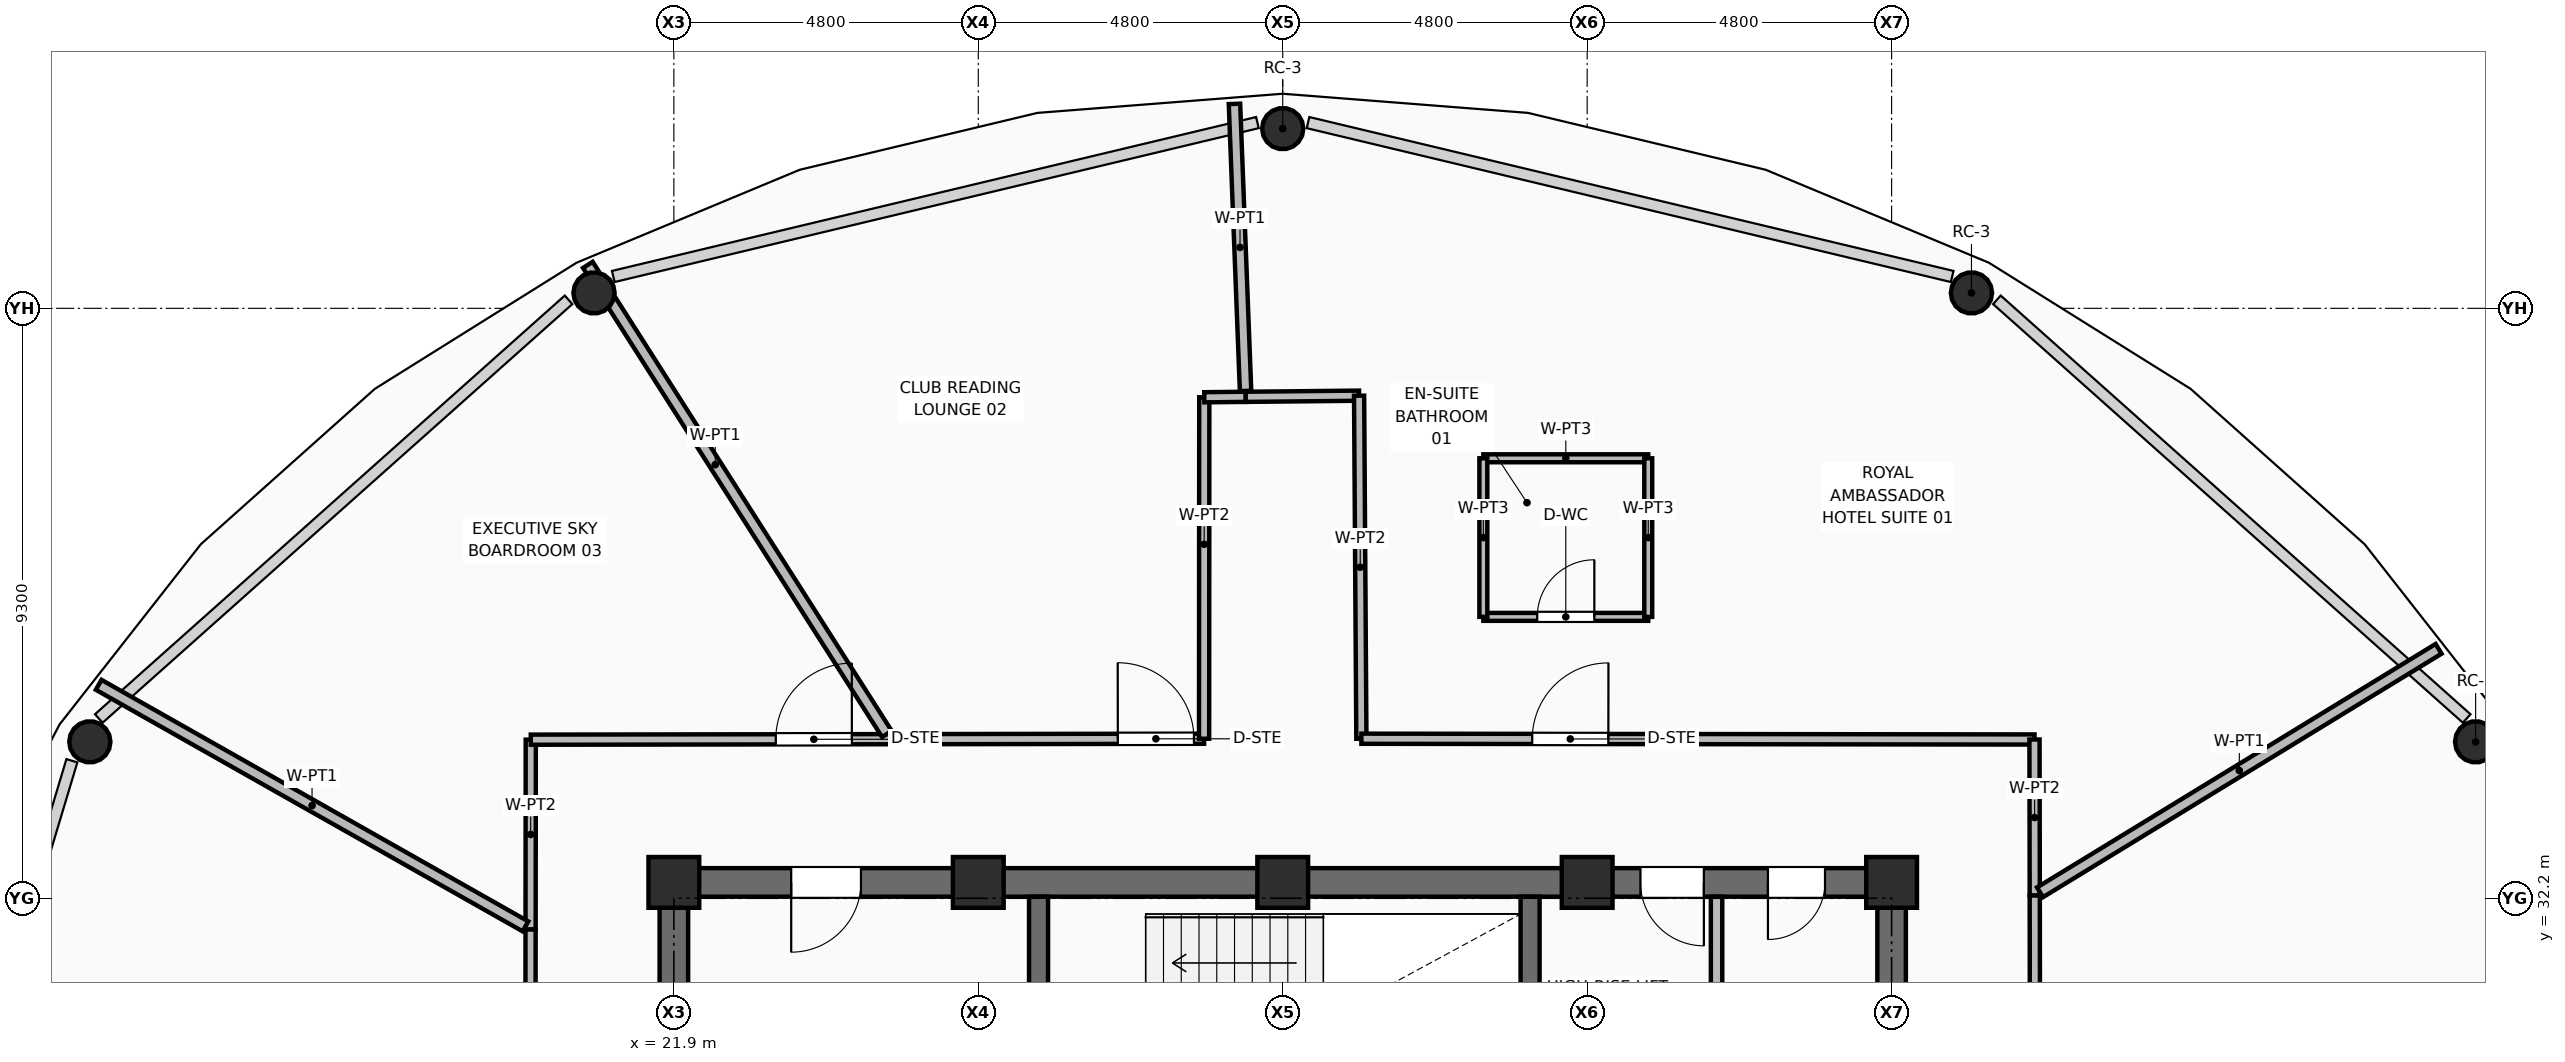
"""IFC4 building model, lengths in metres.
Left out: names, types, materials, properties, quantities, classifications, styles, units other than length and angle.
Written with IfcOpenShell. Run it as: python <this file> out.ifc"""

import sys

from ifc_helpers import new_model, si_unit, direction, frame, frame_2d, origin, origin_2d, place, context, subcontext, project, spatial, rectangle, hollow_circle, extrude, element, fill, save


model = new_model("IFC4")
c1 = context("Model", 3, precision=1e-05, world=origin(), true_north=direction((0.0, 1.0)))
c2 = subcontext(c1, "Body", "Model", "MODEL_VIEW")
j1 = project(units=[si_unit("LENGTHUNIT", "METRE"), si_unit("PLANEANGLEUNIT", "RADIAN")], contexts=[c1])
p1 = place(None, origin())
s1 = spatial("IfcSite", under=j1, at=p1, CompositionType="ELEMENT")
p2 = place(p1, origin())
s2 = spatial("IfcBuilding", under=s1, at=p2, CompositionType="ELEMENT")
p3 = place(p2, frame((0.0, 0.0, 246.15)))
s3 = spatial("IfcBuildingStorey", under=s2, at=p3, CompositionType="ELEMENT", Elevation=246.15)
for number, where, z_axis, x_axis in (
    (1, (21.9, 32.45, 0.0), (0.0, 0.0, 1.0), (1.0, 0.0, 0.0)),
    (2, (26.7, 32.45, 0.0), (0.0, 0.0, 1.0), (1.0, 0.0, 0.0)),
    (3, (31.5, 32.45, 0.0), (0.0, 0.0, 1.0), (1.0, 0.0, 0.0)),
    (4, (36.3, 32.45, 0.0), (0.0, 0.0, 1.0), (1.0, 0.0, 0.0)),
    (5, (41.1, 32.45, 0.0), (0.0, 0.0, 1.0), (1.0, 0.0, 0.0)),
):
    element("IfcColumn", number, at=place(p3, frame(where, z_axis=z_axis, x_axis=x_axis)), inside=s3, PredefinedType="COLUMN", context=c2, shape_type="SweptSolid", body=[
        extrude(rectangle(XDim=0.8, YDim=0.8, at=origin_2d()), origin(), (0.0, 0.0, 1.0), 3.75),
    ])
for number, where, z_axis, x_axis in (
    (6, (50.308, 34.666, 0.0), (0.0, 0.0, 1.0), (1.0, 0.0, 0.0)),
    (7, (42.359, 41.743, 0.0), (0.0, 0.0, 1.0), (1.0, 0.0, 0.0)),
    (8, (31.5, 44.333, 0.0), (0.0, 0.0, 1.0), (1.0, 0.0, 0.0)),
    (9, (20.641, 41.743, 0.0), (0.0, 0.0, 1.0), (1.0, 0.0, 0.0)),
    (10, (12.692, 34.666, 0.0), (0.0, 0.0, 1.0), (1.0, 0.0, 0.0)),
):
    element("IfcColumn", number, at=place(p3, frame(where, z_axis=z_axis, x_axis=x_axis)), inside=s3, PredefinedType="COLUMN", context=c2, shape_type="SweptSolid", body=[
        extrude(hollow_circle(Radius=0.325, WallThickness=0.03, at=origin_2d()), origin(), (0.0, 0.0, 1.0), 3.57),
    ])
p4 = place(p3, frame((21.675, 32.45, 0.0), z_axis=(0.0, 0.0, 1.0), x_axis=(1.0, 0.0, 0.0)))
e11 = element("IfcWall", 11, at=p4, inside=s3, PredefinedType="SHEAR", context=c2, shape_type="SweptSolid", body=[
    extrude(rectangle(XDim=19.65, YDim=0.45, at=frame_2d((9.825, 0.0))), origin(), (0.0, 0.0, 1.0), 3.57),
])
p5 = place(p4, frame((2.075, 0.0, 0.0)))
e12 = element("IfcOpeningElement", 12, at=p5, cuts=e11, PredefinedType="OPENING", context=c2, shape_type="SweptSolid", body=[
    extrude(rectangle(XDim=1.1, YDim=2.1, at=frame_2d((0.55, 1.05))), frame((0.0, 0.235, 0.0), z_axis=(0.0, -1.0, 0.0), x_axis=(1.0, 0.0, 0.0)), (0.0, 0.0, 1.0), 0.47),
])
p6 = place(p4, frame((15.465, 0.0, 0.0)))
e13 = element("IfcOpeningElement", 13, at=p6, cuts=e11, PredefinedType="OPENING", context=c2, shape_type="SweptSolid", body=[
    extrude(rectangle(XDim=1.0, YDim=2.1, at=frame_2d((0.5, 1.05))), frame((0.0, 0.235, 0.0), z_axis=(0.0, -1.0, 0.0), x_axis=(1.0, 0.0, 0.0)), (0.0, 0.0, 1.0), 0.47),
])
p7 = place(p4, frame((17.475, 0.0, 0.0)))
e14 = element("IfcOpeningElement", 14, at=p7, cuts=e11, PredefinedType="OPENING", context=c2, shape_type="SweptSolid", body=[
    extrude(rectangle(XDim=0.9, YDim=2.1, at=frame_2d((0.45, 1.05))), frame((0.0, 0.235, 0.0), z_axis=(0.0, -1.0, 0.0), x_axis=(1.0, 0.0, 0.0)), (0.0, 0.0, 1.0), 0.47),
])
p8 = place(p3, frame((21.9, 18.025, 0.0), z_axis=(0.0, 0.0, 1.0), x_axis=(0.0, 1.0, 0.0)))
e15 = element("IfcWall", 15, at=p8, inside=s3, PredefinedType="SHEAR", context=c2, shape_type="SweptSolid", body=[
    extrude(rectangle(XDim=14.2, YDim=0.45, at=frame_2d((7.1, 0.0))), origin(), (0.0, 0.0, 1.0), 3.57),
])
p9 = place(p3, frame((41.1, 18.025, 0.0), z_axis=(0.0, 0.0, 1.0), x_axis=(0.0, 1.0, 0.0)))
e16 = element("IfcWall", 16, at=p9, inside=s3, PredefinedType="SHEAR", context=c2, shape_type="SweptSolid", body=[
    extrude(rectangle(XDim=14.2, YDim=0.45, at=frame_2d((7.1, 0.0))), origin(), (0.0, 0.0, 1.0), 3.57),
])
p10 = place(p9, frame((3.435, 0.0, 0.0)))
e17 = element("IfcOpeningElement", 17, at=p10, cuts=e16, PredefinedType="OPENING", context=c2, shape_type="SweptSolid", body=[
    extrude(rectangle(XDim=1.05, YDim=2.1, at=frame_2d((0.525, 1.05))), frame((0.0, 0.235, 0.0), z_axis=(0.0, -1.0, 0.0), x_axis=(1.0, 0.0, 0.0)), (0.0, 0.0, 1.0), 0.47),
])
p11 = place(p3, frame((27.65, 28.75, 0.0), z_axis=(0.0, 0.0, 1.0), x_axis=(0.0, 1.0, 0.0)))
e18 = element("IfcWall", 18, at=p11, inside=s3, PredefinedType="SHEAR", context=c2, shape_type="SweptSolid", body=[
    extrude(rectangle(XDim=3.475, YDim=0.3, at=frame_2d((1.738, 0.0))), origin(), (0.0, 0.0, 1.0), 3.57),
])
p12 = place(p11, frame((1.0, 0.0, 0.0)))
e19 = element("IfcOpeningElement", 19, at=p12, cuts=e18, PredefinedType="OPENING", context=c2, shape_type="SweptSolid", body=[
    extrude(rectangle(XDim=1.05, YDim=2.1, at=frame_2d((0.525, 1.05))), frame((0.0, 0.16, 0.0), z_axis=(0.0, -1.0, 0.0), x_axis=(1.0, 0.0, 0.0)), (0.0, 0.0, 1.0), 0.32),
])
p13 = place(p3, frame((35.4, 28.75, 0.0), z_axis=(0.0, 0.0, 1.0), x_axis=(0.0, 1.0, 0.0)))
e20 = element("IfcWall", 20, at=p13, inside=s3, PredefinedType="SHEAR", context=c2, shape_type="SweptSolid", body=[
    extrude(rectangle(XDim=3.475, YDim=0.3, at=frame_2d((1.738, 0.0))), origin(), (0.0, 0.0, 1.0), 3.57),
])
p14 = place(p3, frame((38.34, 28.62, 0.0), z_axis=(0.0, 0.0, 1.0), x_axis=(0.0, 1.0, 0.0)))
e21 = element("IfcWall", 21, at=p14, inside=s3, PredefinedType="PARTITIONING", context=c2, shape_type="SweptSolid", body=[
    extrude(rectangle(XDim=3.605, YDim=0.18, at=frame_2d((1.802, 0.0))), origin(), (0.0, 0.0, 1.0), 3.55),
])
p15 = place(p3, frame((19.636, 26.142, 0.0), z_axis=(0.0, 0.0, 1.0), x_axis=(0.000920648448, 0.999999576203, 0.0)))
e22 = element("IfcWall", 22, at=p15, inside=s3, PredefinedType="PARTITIONING", context=c2, shape_type="SweptSolid", body=[
    extrude(rectangle(XDim=5.569, YDim=0.16, at=frame_2d((2.784, 0.0))), origin(), (0.0, 0.0, 1.0), 3.55),
])
p16 = place(p15, frame((0.16, 0.0, 0.0)))
e23 = element("IfcOpeningElement", 23, at=p16, cuts=e22, PredefinedType="OPENING", context=c2, shape_type="SweptSolid", body=[
    extrude(rectangle(XDim=1.2, YDim=2.1, at=frame_2d((0.6, 1.05))), frame((0.0, 0.09, 0.0), z_axis=(0.0, -1.0, 0.0), x_axis=(1.0, 0.0, 0.0)), (0.0, 0.0, 1.0), 0.18),
])
p17 = place(p3, frame((19.641, 31.711, 0.0), z_axis=(0.0, 0.0, 1.0), x_axis=(0.000980151453, 0.999999519651, 0.0)))
e24 = element("IfcWall", 24, at=p17, inside=s3, PredefinedType="PARTITIONING", context=c2, shape_type="SweptSolid", body=[
    extrude(rectangle(XDim=2.989, YDim=0.16, at=frame_2d((1.495, 0.0))), origin(), (0.0, 0.0, 1.0), 3.081),
])
p18 = place(p3, frame((19.644, 34.7, 0.0), z_axis=(0.0, 0.0, 1.0), x_axis=(0.999998989417, 0.001421677005, 0.0)))
e25 = element("IfcWall", 25, at=p18, inside=s3, PredefinedType="PARTITIONING", context=c2, shape_type="SweptSolid", body=[
    extrude(rectangle(XDim=5.667, YDim=0.16, at=frame_2d((2.833, 0.0))), origin(), (0.0, 0.0, 1.0), 3.081),
])
p19 = place(p18, frame((3.863, 0.0, 0.0)))
e26 = element("IfcOpeningElement", 26, at=p19, cuts=e25, PredefinedType="OPENING", context=c2, shape_type="SweptSolid", body=[
    extrude(rectangle(XDim=1.2, YDim=2.1, at=frame_2d((0.6, 1.05))), frame((0.0, 0.09, 0.0), z_axis=(0.0, -1.0, 0.0), x_axis=(1.0, 0.0, 0.0)), (0.0, 0.0, 1.0), 0.18),
])
p20 = place(p3, frame((25.311, 34.708, 0.0), z_axis=(0.0, 0.0, 1.0), x_axis=(0.999998976672, 0.001430613701, 0.0)))
e27 = element("IfcWall", 27, at=p20, inside=s3, PredefinedType="PARTITIONING", context=c2, shape_type="SweptSolid", body=[
    extrude(rectangle(XDim=4.949, YDim=0.16, at=frame_2d((2.475, 0.0))), origin(), (0.0, 0.0, 1.0), 3.55),
])
p21 = place(p20, frame((3.589, 0.0, 0.0)))
e28 = element("IfcOpeningElement", 28, at=p21, cuts=e27, PredefinedType="OPENING", context=c2, shape_type="SweptSolid", body=[
    extrude(rectangle(XDim=1.2, YDim=2.1, at=frame_2d((0.6, 1.05))), frame((0.0, 0.09, 0.0), z_axis=(0.0, -1.0, 0.0), x_axis=(1.0, 0.0, 0.0)), (0.0, 0.0, 1.0), 0.18),
])
p22 = place(p3, frame((30.26, 34.715, 0.0), z_axis=(0.0, 0.0, 1.0), x_axis=(0.000544266973, 0.999999851887, 0.0)))
e29 = element("IfcWall", 29, at=p22, inside=s3, PredefinedType="PARTITIONING", context=c2, shape_type="SweptSolid", body=[
    extrude(rectangle(XDim=5.383, YDim=0.16, at=frame_2d((2.691, 0.0))), origin(), (0.0, 0.0, 1.0), 3.55),
])
p23 = place(p3, frame((30.263, 40.098, 0.0), z_axis=(0.0, 0.0, 1.0), x_axis=(0.999941415543, 0.010824300504, 0.0)))
e30 = element("IfcWall", 30, at=p23, inside=s3, PredefinedType="PARTITIONING", context=c2, shape_type="SweptSolid", body=[
    extrude(rectangle(XDim=0.654, YDim=0.16, at=frame_2d((0.327, 0.0))), origin(), (0.0, 0.0, 1.0), 3.55),
])
p24 = place(p3, frame((30.917, 40.105, 0.0), z_axis=(0.0, 0.0, 1.0), x_axis=(0.999948905048, 0.010108773084, 0.0)))
e31 = element("IfcWall", 31, at=p24, inside=s3, PredefinedType="PARTITIONING", context=c2, shape_type="SweptSolid", body=[
    extrude(rectangle(XDim=1.787, YDim=0.16, at=frame_2d((0.894, 0.0))), origin(), (0.0, 0.0, 1.0), 3.081),
])
p25 = place(p3, frame((32.704, 40.123, 0.0), z_axis=(0.0, 0.0, 1.0), x_axis=(0.006636123117, -0.999977980693, 0.0)))
e32 = element("IfcWall", 32, at=p25, inside=s3, PredefinedType="PARTITIONING", context=c2, shape_type="SweptSolid", body=[
    extrude(rectangle(XDim=5.408, YDim=0.16, at=frame_2d((2.704, 0.0))), origin(), (0.0, 0.0, 1.0), 3.55),
])
p26 = place(p3, frame((32.74, 34.715, 0.0), z_axis=(0.0, 0.0, 1.0), x_axis=(0.99999933853, -0.001150191321, 0.0)))
e33 = element("IfcWall", 33, at=p26, inside=s3, PredefinedType="PARTITIONING", context=c2, shape_type="SweptSolid", body=[
    extrude(rectangle(XDim=10.613, YDim=0.16, at=frame_2d((5.307, 0.0))), origin(), (0.0, 0.0, 1.0), 3.081),
])
p27 = place(p26, frame((2.694, 0.0, 0.0)))
e34 = element("IfcOpeningElement", 34, at=p27, cuts=e33, PredefinedType="OPENING", context=c2, shape_type="SweptSolid", body=[
    extrude(rectangle(XDim=1.2, YDim=2.1, at=frame_2d((0.6, 1.05))), frame((0.0, 0.09, 0.0), z_axis=(0.0, -1.0, 0.0), x_axis=(1.0, 0.0, 0.0)), (0.0, 0.0, 1.0), 0.18),
])
p28 = place(p3, frame((43.353, 34.703, 0.0), z_axis=(0.0, 0.0, 1.0), x_axis=(0.001587929717, -0.999998739239, 0.0)))
e35 = element("IfcWall", 35, at=p28, inside=s3, PredefinedType="PARTITIONING", context=c2, shape_type="SweptSolid", body=[
    extrude(rectangle(XDim=2.46, YDim=0.16, at=frame_2d((1.23, 0.0))), origin(), (0.0, 0.0, 1.0), 3.081),
])
p29 = place(p3, frame((43.357, 32.243, 0.0), z_axis=(0.0, 0.0, 1.0), x_axis=(0.00127822648, -0.999999183068, 0.0)))
e36 = element("IfcWall", 36, at=p29, inside=s3, PredefinedType="PARTITIONING", context=c2, shape_type="SweptSolid", body=[
    extrude(rectangle(XDim=6.303, YDim=0.16, at=frame_2d((3.151, 0.0))), origin(), (0.0, 0.0, 1.0), 3.55),
])
p30 = place(p29, frame((4.943, 0.0, 0.0)))
e37 = element("IfcOpeningElement", 37, at=p30, cuts=e36, PredefinedType="OPENING", context=c2, shape_type="SweptSolid", body=[
    extrude(rectangle(XDim=1.2, YDim=2.1, at=frame_2d((0.6, 1.05))), frame((0.0, 0.09, 0.0), z_axis=(0.0, -1.0, 0.0), x_axis=(1.0, 0.0, 0.0)), (0.0, 0.0, 1.0), 0.18),
])
p31 = place(p3, frame((43.44, 32.294, 0.0), z_axis=(0.0, 0.0, 1.0), x_axis=(0.853414575763, 0.521232732928, 0.0)))
e38 = element("IfcWall", 38, at=p31, inside=s3, PredefinedType="PARTITIONING", context=c2, shape_type="SweptSolid", body=[
    extrude(rectangle(XDim=7.364, YDim=0.18, at=frame_2d((3.682, 0.0))), origin(), (0.0, 0.0, 1.0), 2.925),
])
p32 = place(p3, frame((30.914, 40.198, 0.0), z_axis=(0.0, 0.0, 1.0), x_axis=(-0.038656743146, 0.999252548763, 0.0)))
e39 = element("IfcWall", 39, at=p32, inside=s3, PredefinedType="PARTITIONING", context=c2, shape_type="SweptSolid", body=[
    extrude(rectangle(XDim=4.528, YDim=0.18, at=frame_2d((2.264, 0.0))), origin(), (0.0, 0.0, 1.0), 2.925),
])
p33 = place(p3, frame((25.259, 34.79, 0.0), z_axis=(0.0, 0.0, 1.0), x_axis=(-0.537619190812, 0.843187764185, 0.0)))
e40 = element("IfcWall", 40, at=p33, inside=s3, PredefinedType="PARTITIONING", context=c2, shape_type="SweptSolid", body=[
    extrude(rectangle(XDim=8.77, YDim=0.18, at=frame_2d((4.385, 0.0))), origin(), (0.0, 0.0, 1.0), 2.925),
])
p34 = place(p3, frame((19.56, 31.757, 0.0), z_axis=(0.0, 0.0, 1.0), x_axis=(-0.870312783113, 0.492499400559, 0.0)))
e41 = element("IfcWall", 41, at=p34, inside=s3, PredefinedType="PARTITIONING", context=c2, shape_type="SweptSolid", body=[
    extrude(rectangle(XDim=7.732, YDim=0.18, at=frame_2d((3.866, 0.0))), origin(), (0.0, 0.0, 1.0), 2.925),
])
p35 = place(p3, frame((34.663, 36.636, 0.0), z_axis=(0.0, 0.0, 1.0), x_axis=(1.0, 0.0, 0.0)))
e42 = element("IfcWall", 42, at=p35, inside=s3, PredefinedType="PARTITIONING", context=c2, shape_type="SweptSolid", body=[
    extrude(rectangle(XDim=2.6, YDim=0.125, at=frame_2d((1.3, 0.0))), origin(), (0.0, 0.0, 1.0), 3.55),
])
p36 = place(p35, frame((0.85, 0.0, 0.0)))
e43 = element("IfcOpeningElement", 43, at=p36, cuts=e42, PredefinedType="OPENING", context=c2, shape_type="SweptSolid", body=[
    extrude(rectangle(XDim=0.9, YDim=2.1, at=frame_2d((0.45, 1.05))), frame((0.0, 0.073, 0.0), z_axis=(0.0, -1.0, 0.0), x_axis=(1.0, 0.0, 0.0)), (0.0, 0.0, 1.0), 0.145),
])
p37 = place(p3, frame((34.663, 39.136, 0.0), z_axis=(0.0, 0.0, 1.0), x_axis=(1.0, 0.0, 0.0)))
e44 = element("IfcWall", 44, at=p37, inside=s3, PredefinedType="PARTITIONING", context=c2, shape_type="SweptSolid", body=[
    extrude(rectangle(XDim=2.6, YDim=0.125, at=frame_2d((1.3, 0.0))), origin(), (0.0, 0.0, 1.0), 3.55),
])
for number, where, z_axis, x_axis in (
    (45, (34.663, 36.636, 0.0), (0.0, 0.0, 1.0), (0.0, 1.0, 0.0)),
    (46, (37.263, 36.636, 0.0), (0.0, 0.0, 1.0), (0.0, 1.0, 0.0)),
):
    element("IfcWall", number, at=place(p3, frame(where, z_axis=z_axis, x_axis=x_axis)), inside=s3, PredefinedType="PARTITIONING", context=c2, shape_type="SweptSolid", body=[
        extrude(rectangle(XDim=2.5, YDim=0.125, at=frame_2d((1.25, 0.0))), origin(), (0.0, 0.0, 1.0), 3.55),
    ])
p38 = place(p5, frame((1.1, 0.0, 0.0), z_axis=(0.0, 0.0, 1.0), x_axis=(-1.0, 0.0, 0.0)))
e47 = element("IfcDoor", 47, at=p38, inside=s3, OperationType="SINGLE_SWING_RIGHT", PredefinedType="DOOR", context=c2, shape_type="SweptSolid", body=[
    extrude(rectangle(XDim=1.1, YDim=2.1, at=frame_2d((0.55, 1.05))), frame((0.0, 0.025, 0.0), z_axis=(0.0, -1.0, 0.0), x_axis=(1.0, 0.0, 0.0)), (0.0, 0.0, 1.0), 0.05),
])
fill(e12, e47)
p39 = place(p6, frame((1.0, 0.0, 0.0), z_axis=(0.0, 0.0, 1.0), x_axis=(-1.0, 0.0, 0.0)))
e48 = element("IfcDoor", 48, at=p39, inside=s3, OperationType="SINGLE_SWING_LEFT", PredefinedType="DOOR", context=c2, shape_type="SweptSolid", body=[
    extrude(rectangle(XDim=1.0, YDim=2.1, at=frame_2d((0.5, 1.05))), frame((0.0, 0.025, 0.0), z_axis=(0.0, -1.0, 0.0), x_axis=(1.0, 0.0, 0.0)), (0.0, 0.0, 1.0), 0.05),
])
fill(e13, e48)
p40 = place(p7, frame((0.9, 0.0, 0.0), z_axis=(0.0, 0.0, 1.0), x_axis=(-1.0, 0.0, 0.0)))
e49 = element("IfcDoor", 49, at=p40, inside=s3, OperationType="SINGLE_SWING_RIGHT", PredefinedType="DOOR", context=c2, shape_type="SweptSolid", body=[
    extrude(rectangle(XDim=0.9, YDim=2.1, at=frame_2d((0.45, 1.05))), frame((0.0, 0.025, 0.0), z_axis=(0.0, -1.0, 0.0), x_axis=(1.0, 0.0, 0.0)), (0.0, 0.0, 1.0), 0.05),
])
fill(e14, e49)
p41 = place(p36, origin())
e50 = element("IfcDoor", 50, at=p41, inside=s3, OperationType="SINGLE_SWING_RIGHT", PredefinedType="DOOR", context=c2, shape_type="SweptSolid", body=[
    extrude(rectangle(XDim=0.9, YDim=2.1, at=frame_2d((0.45, 1.05))), frame((0.0, 0.025, 0.0), z_axis=(0.0, -1.0, 0.0), x_axis=(1.0, 0.0, 0.0)), (0.0, 0.0, 1.0), 0.05),
])
fill(e43, e50)
p42 = place(p27, origin())
e51 = element("IfcDoor", 51, at=p42, inside=s3, OperationType="SINGLE_SWING_RIGHT", PredefinedType="DOOR", context=c2, shape_type="SweptSolid", body=[
    extrude(rectangle(XDim=1.2, YDim=2.1, at=frame_2d((0.6, 1.05))), frame((0.0, 0.025, 0.0), z_axis=(0.0, -1.0, 0.0), x_axis=(1.0, 0.0, 0.0)), (0.0, 0.0, 1.0), 0.05),
])
fill(e34, e51)
p43 = place(p21, origin())
e52 = element("IfcDoor", 52, at=p43, inside=s3, OperationType="SINGLE_SWING_LEFT", PredefinedType="DOOR", context=c2, shape_type="SweptSolid", body=[
    extrude(rectangle(XDim=1.2, YDim=2.1, at=frame_2d((0.6, 1.05))), frame((0.0, 0.025, 0.0), z_axis=(0.0, -1.0, 0.0), x_axis=(1.0, 0.0, 0.0)), (0.0, 0.0, 1.0), 0.05),
])
fill(e28, e52)
p44 = place(p19, origin())
e53 = element("IfcDoor", 53, at=p44, inside=s3, OperationType="SINGLE_SWING_RIGHT", PredefinedType="DOOR", context=c2, shape_type="SweptSolid", body=[
    extrude(rectangle(XDim=1.2, YDim=2.1, at=frame_2d((0.6, 1.05))), frame((0.0, 0.025, 0.0), z_axis=(0.0, -1.0, 0.0), x_axis=(1.0, 0.0, 0.0)), (0.0, 0.0, 1.0), 0.05),
])
fill(e26, e53)
save(model, sys.argv[1])
